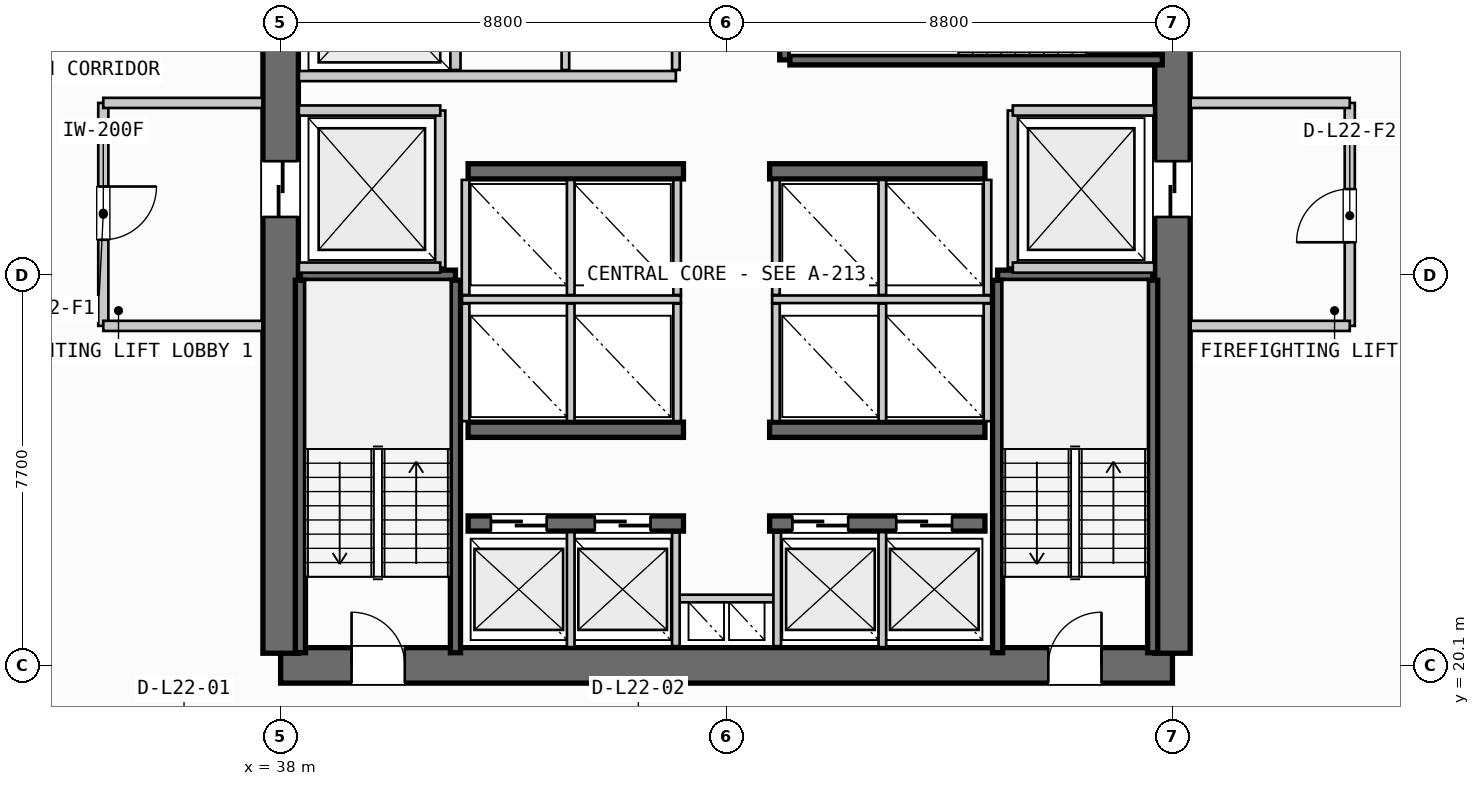
"""IFC4 building model, lengths in metres.
Left out: names, types, materials, properties, quantities, classifications, styles, units other than length and angle.
Written with IfcOpenShell. Run it as: python <this file> out.ifc"""

import sys

from ifc_helpers import new_model, si_unit, direction, frame, frame_2d, origin, place, context, subcontext, project, spatial, rectangle, extrude, source, transform, mapped, element, fill, save


model = new_model("IFC4")
c1 = context("Model", 3, precision=1e-05, world=origin(), true_north=direction((0.0, 1.0)))
c2 = subcontext(c1, "Body", "Model", "MODEL_VIEW")
j1 = project(units=[si_unit("LENGTHUNIT", "METRE"), si_unit("PLANEANGLEUNIT", "RADIAN")], contexts=[c1])
p1 = place(None, origin())
s1 = spatial("IfcSite", under=j1, at=p1, CompositionType="ELEMENT")
p2 = place(p1, origin())
s2 = spatial("IfcBuilding", under=s1, at=p2, CompositionType="ELEMENT")
p3 = place(p2, frame((0.0, 0.0, 92.8)))
s3 = spatial("IfcBuildingStorey", under=s2, at=p3, CompositionType="ELEMENT", Elevation=92.8)
p4 = place(p3, frame((38.0, 20.1, 0.0), z_axis=(0.0, 0.0, 1.0), x_axis=(1.0, 0.0, 0.0)))
e1 = element("IfcWall", 1, at=p4, inside=s3, PredefinedType="SHEAR", context=c2, shape_type="SweptSolid", body=[
    extrude(rectangle(XDim=17.6, YDim=0.7, at=frame_2d((8.8, 0.0))), origin(), (0.0, 0.0, 1.0), 3.35),
])
p5 = place(p4, frame((1.4, 0.0, 0.0)))
e2 = element("IfcOpeningElement", 2, at=p5, cuts=e1, PredefinedType="OPENING", context=c2, shape_type="SweptSolid", body=[
    extrude(rectangle(XDim=1.05, YDim=2.15, at=frame_2d((0.525, 1.075))), frame((0.0, 0.36, 0.0), z_axis=(0.0, -1.0, 0.0), x_axis=(1.0, 0.0, 0.0)), (0.0, 0.0, 1.0), 0.72),
])
p6 = place(p4, frame((15.15, 0.0, 0.0)))
e3 = element("IfcOpeningElement", 3, at=p6, cuts=e1, PredefinedType="OPENING", context=c2, shape_type="SweptSolid", body=[
    extrude(rectangle(XDim=1.05, YDim=2.15, at=frame_2d((0.525, 1.075))), frame((0.0, 0.36, 0.0), z_axis=(0.0, -1.0, 0.0), x_axis=(1.0, 0.0, 0.0)), (0.0, 0.0, 1.0), 0.72),
])
p7 = place(p3, frame((38.0, 35.26, 0.0), z_axis=(0.0, 0.0, 1.0), x_axis=(0.0, -1.0, 0.0)))
e4 = element("IfcWall", 4, at=p7, inside=s3, PredefinedType="SHEAR", context=c2, shape_type="SweptSolid", body=[
    extrude(rectangle(XDim=14.92, YDim=0.7, at=frame_2d((7.46, 0.0))), origin(), (0.0, 0.0, 1.0), 3.35),
])
p8 = place(p7, frame((5.21, 0.0, 0.0)))
e5 = element("IfcOpeningElement", 5, at=p8, cuts=e4, PredefinedType="OPENING", context=c2, shape_type="SweptSolid", body=[
    extrude(rectangle(XDim=1.1, YDim=2.2, at=frame_2d((0.55, 1.1))), frame((0.0, 0.36, 0.0), z_axis=(0.0, -1.0, 0.0), x_axis=(1.0, 0.0, 0.0)), (0.0, 0.0, 1.0), 0.72),
])
p9 = place(p3, frame((55.6, 20.34, 0.0), z_axis=(0.0, 0.0, 1.0), x_axis=(0.0, 1.0, 0.0)))
e6 = element("IfcWall", 6, at=p9, inside=s3, PredefinedType="SHEAR", context=c2, shape_type="SweptSolid", body=[
    extrude(rectangle(XDim=14.92, YDim=0.7, at=frame_2d((7.46, 0.0))), origin(), (0.0, 0.0, 1.0), 3.35),
])
p10 = place(p9, frame((12.71, 0.0, 0.0)))
e7 = element("IfcOpeningElement", 7, at=p10, cuts=e6, PredefinedType="OPENING", context=c2, shape_type="SweptSolid", body=[
    extrude(rectangle(XDim=1.05, YDim=2.15, at=frame_2d((0.525, 1.075))), frame((0.0, 0.36, 0.0), z_axis=(0.0, -1.0, 0.0), x_axis=(1.0, 0.0, 0.0)), (0.0, 0.0, 1.0), 0.72),
])
p11 = place(p9, frame((8.61, 0.0, 0.0)))
e8 = element("IfcOpeningElement", 8, at=p11, cuts=e6, PredefinedType="OPENING", context=c2, shape_type="SweptSolid", body=[
    extrude(rectangle(XDim=1.1, YDim=2.2, at=frame_2d((0.55, 1.1))), frame((0.0, 0.36, 0.0), z_axis=(0.0, -1.0, 0.0), x_axis=(1.0, 0.0, 0.0)), (0.0, 0.0, 1.0), 0.72),
])
p12 = place(p3, frame((41.7, 22.9, 0.0), z_axis=(0.0, 0.0, 1.0), x_axis=(1.0, 0.0, 0.0)))
e9 = element("IfcWall", 9, at=p12, inside=s3, PredefinedType="SHEAR", context=c2, shape_type="SweptSolid", body=[
    extrude(rectangle(XDim=4.25, YDim=0.3, at=frame_2d((2.125, 0.0))), origin(), (0.0, 0.0, 1.0), 3.35),
])
p13 = place(p12, frame((0.45, 0.0, 0.0)))
e10 = element("IfcOpeningElement", 10, at=p13, cuts=e9, PredefinedType="OPENING", context=c2, shape_type="SweptSolid", body=[
    extrude(rectangle(XDim=1.1, YDim=2.2, at=frame_2d((0.55, 1.1))), frame((0.0, 0.16, 0.0), z_axis=(0.0, -1.0, 0.0), x_axis=(1.0, 0.0, 0.0)), (0.0, 0.0, 1.0), 0.32),
])
p14 = place(p12, frame((2.5, 0.0, 0.0)))
e11 = element("IfcOpeningElement", 11, at=p14, cuts=e9, PredefinedType="OPENING", context=c2, shape_type="SweptSolid", body=[
    extrude(rectangle(XDim=1.1, YDim=2.2, at=frame_2d((0.55, 1.1))), frame((0.0, 0.16, 0.0), z_axis=(0.0, -1.0, 0.0), x_axis=(1.0, 0.0, 0.0)), (0.0, 0.0, 1.0), 0.32),
])
p15 = place(p3, frame((47.65, 22.9, 0.0), z_axis=(0.0, 0.0, 1.0), x_axis=(1.0, 0.0, 0.0)))
e12 = element("IfcWall", 12, at=p15, inside=s3, PredefinedType="SHEAR", context=c2, shape_type="SweptSolid", body=[
    extrude(rectangle(XDim=4.25, YDim=0.3, at=frame_2d((2.125, 0.0))), origin(), (0.0, 0.0, 1.0), 3.35),
])
p16 = place(p15, frame((0.45, 0.0, 0.0)))
e13 = element("IfcOpeningElement", 13, at=p16, cuts=e12, PredefinedType="OPENING", context=c2, shape_type="SweptSolid", body=[
    extrude(rectangle(XDim=1.1, YDim=2.2, at=frame_2d((0.55, 1.1))), frame((0.0, 0.16, 0.0), z_axis=(0.0, -1.0, 0.0), x_axis=(1.0, 0.0, 0.0)), (0.0, 0.0, 1.0), 0.32),
])
p17 = place(p15, frame((2.5, 0.0, 0.0)))
e14 = element("IfcOpeningElement", 14, at=p17, cuts=e12, PredefinedType="OPENING", context=c2, shape_type="SweptSolid", body=[
    extrude(rectangle(XDim=1.1, YDim=2.2, at=frame_2d((0.55, 1.1))), frame((0.0, 0.16, 0.0), z_axis=(0.0, -1.0, 0.0), x_axis=(1.0, 0.0, 0.0)), (0.0, 0.0, 1.0), 0.32),
])
for number, where, z_axis, x_axis in (
    (15, (41.7, 24.75, 0.0), (0.0, 0.0, 1.0), (1.0, 0.0, 0.0)),
    (16, (47.65, 24.75, 0.0), (0.0, 0.0, 1.0), (1.0, 0.0, 0.0)),
    (17, (41.7, 29.85, 0.0), (0.0, 0.0, 1.0), (1.0, 0.0, 0.0)),
    (18, (47.65, 29.85, 0.0), (0.0, 0.0, 1.0), (1.0, 0.0, 0.0)),
):
    element("IfcWall", number, at=place(p3, frame(where, z_axis=z_axis, x_axis=x_axis)), inside=s3, PredefinedType="SHEAR", context=c2, shape_type="SweptSolid", body=[
        extrude(rectangle(XDim=4.25, YDim=0.3, at=frame_2d((2.125, 0.0))), origin(), (0.0, 0.0, 1.0), 3.35),
    ])
p18 = place(p3, frame((38.39, 27.8, 0.0), z_axis=(0.0, 0.0, 1.0), x_axis=(1.0, 0.0, 0.0)))
e19 = element("IfcWall", 19, at=p18, inside=s3, PredefinedType="SHEAR", context=c2, shape_type="SweptSolid", body=[
    extrude(rectangle(XDim=3.06, YDim=0.2, at=frame_2d((1.53, 0.0))), origin(), (0.0, 0.0, 1.0), 3.35),
])
for number, where, z_axis, x_axis in (
    (20, (41.45, 27.7, 0.0), (0.0, 0.0, 1.0), (0.0, -1.0, 0.0)),
    (21, (38.39, 20.35, 0.0), (0.0, 0.0, 1.0), (0.0, 1.0, 0.0)),
):
    element("IfcWall", number, at=place(p3, frame(where, z_axis=z_axis, x_axis=x_axis)), inside=s3, PredefinedType="SHEAR", context=c2, shape_type="SweptSolid", body=[
        extrude(rectangle(XDim=7.35, YDim=0.2, at=frame_2d((3.675, 0.0))), origin(), (0.0, 0.0, 1.0), 3.35),
    ])
p19 = place(p3, frame((52.15, 27.8, 0.0), z_axis=(0.0, 0.0, 1.0), x_axis=(1.0, 0.0, 0.0)))
e22 = element("IfcWall", 22, at=p19, inside=s3, PredefinedType="SHEAR", context=c2, shape_type="SweptSolid", body=[
    extrude(rectangle(XDim=3.06, YDim=0.2, at=frame_2d((1.53, 0.0))), origin(), (0.0, 0.0, 1.0), 3.35),
])
for number, where, z_axis, x_axis in (
    (23, (55.21, 27.7, 0.0), (0.0, 0.0, 1.0), (0.0, -1.0, 0.0)),
    (24, (52.15, 20.35, 0.0), (0.0, 0.0, 1.0), (0.0, 1.0, 0.0)),
):
    element("IfcWall", number, at=place(p3, frame(where, z_axis=z_axis, x_axis=x_axis)), inside=s3, PredefinedType="SHEAR", context=c2, shape_type="SweptSolid", body=[
        extrude(rectangle(XDim=7.35, YDim=0.2, at=frame_2d((3.675, 0.0))), origin(), (0.0, 0.0, 1.0), 3.35),
    ])
p20 = place(p3, frame((47.95, 32.05, 0.0), z_axis=(0.0, 0.0, 1.0), x_axis=(0.0, 1.0, 0.0)))
e25 = element("IfcWall", 25, at=p20, inside=s3, PredefinedType="SHEAR", context=c2, shape_type="SweptSolid", body=[
    extrude(rectangle(XDim=3.06, YDim=0.2, at=frame_2d((1.53, 0.0))), origin(), (0.0, 0.0, 1.0), 3.35),
])
p21 = place(p3, frame((55.4, 32.05, 0.0), z_axis=(0.0, 0.0, 1.0), x_axis=(-1.0, 0.0, 0.0)))
e26 = element("IfcWall", 26, at=p21, inside=s3, PredefinedType="SHEAR", context=c2, shape_type="SweptSolid", body=[
    extrude(rectangle(XDim=7.35, YDim=0.2, at=frame_2d((3.675, 0.0))), origin(), (0.0, 0.0, 1.0), 3.35),
])
p22 = place(p3, frame((45.8, 21.42, 0.0), z_axis=(0.0, 0.0, 1.0), x_axis=(1.0, 0.0, 0.0)))
e27 = element("IfcWall", 27, at=p22, inside=s3, PredefinedType="PARTITIONING", context=c2, shape_type="SweptSolid", body=[
    extrude(rectangle(XDim=2.0, YDim=0.15, at=frame_2d((1.0, 0.0))), origin(), (0.0, 0.0, 1.0), 2.28),
])
for number, where, z_axis, x_axis in (
    (28, (45.8, 20.48, 0.0), (0.0, 0.0, 1.0), (0.0, 1.0, 0.0)),
    (29, (47.8, 20.48, 0.0), (0.0, 0.0, 1.0), (0.0, 1.0, 0.0)),
):
    element("IfcWall", number, at=place(p3, frame(where, z_axis=z_axis, x_axis=x_axis)), inside=s3, PredefinedType="PARTITIONING", context=c2, shape_type="SweptSolid", body=[
        extrude(rectangle(XDim=2.24, YDim=0.15, at=frame_2d((1.12, 0.0))), origin(), (0.0, 0.0, 1.0), 2.28),
    ])
p23 = place(p3, frame((41.15, 27.95, 0.0), z_axis=(0.0, 0.0, 1.0), x_axis=(0.0, 1.0, 0.0)))
e30 = element("IfcWall", 30, at=p23, inside=s3, PredefinedType="PARTITIONING", context=c2, shape_type="SweptSolid", body=[
    extrude(rectangle(XDim=3.1, YDim=0.2, at=frame_2d((1.55, 0.0))), origin(), (0.0, 0.0, 1.0), 2.28),
])
for number, where, z_axis, x_axis in (
    (31, (38.36, 27.95, 0.0), (0.0, 0.0, 1.0), (1.0, 0.0, 0.0)),
    (32, (38.36, 31.05, 0.0), (0.0, 0.0, 1.0), (1.0, 0.0, 0.0)),
):
    element("IfcWall", number, at=place(p3, frame(where, z_axis=z_axis, x_axis=x_axis)), inside=s3, PredefinedType="PARTITIONING", context=c2, shape_type="SweptSolid", body=[
        extrude(rectangle(XDim=2.79, YDim=0.2, at=frame_2d((1.395, 0.0))), origin(), (0.0, 0.0, 1.0), 2.28),
    ])
p24 = place(p3, frame((34.5, 31.2, 0.0), z_axis=(0.0, 0.0, 1.0), x_axis=(0.0, -1.0, 0.0)))
e33 = element("IfcWall", 33, at=p24, inside=s3, PredefinedType="PARTITIONING", context=c2, shape_type="SweptSolid", body=[
    extrude(rectangle(XDim=4.4, YDim=0.2, at=frame_2d((2.2, 0.0))), origin(), (0.0, 0.0, 1.0), 2.28),
])
p25 = place(p24, frame((1.65, 0.0, 0.0)))
e34 = element("IfcOpeningElement", 34, at=p25, cuts=e33, PredefinedType="OPENING", context=c2, shape_type="SweptSolid", body=[
    extrude(rectangle(XDim=1.05, YDim=2.15, at=frame_2d((0.525, 1.075))), frame((0.0, 0.11, 0.0), z_axis=(0.0, -1.0, 0.0), x_axis=(1.0, 0.0, 0.0)), (0.0, 0.0, 1.0), 0.22),
])
for number, where, z_axis, x_axis in (
    (35, (34.5, 26.8, 0.0), (0.0, 0.0, 1.0), (1.0, 0.0, 0.0)),
    (36, (34.5, 31.2, 0.0), (0.0, 0.0, 1.0), (1.0, 0.0, 0.0)),
):
    element("IfcWall", number, at=place(p3, frame(where, z_axis=z_axis, x_axis=x_axis)), inside=s3, PredefinedType="PARTITIONING", context=c2, shape_type="SweptSolid", body=[
        extrude(rectangle(XDim=3.14, YDim=0.2, at=frame_2d((1.57, 0.0))), origin(), (0.0, 0.0, 1.0), 2.28),
    ])
p26 = place(p3, frame((52.45, 27.95, 0.0), z_axis=(0.0, 0.0, 1.0), x_axis=(0.0, 1.0, 0.0)))
e37 = element("IfcWall", 37, at=p26, inside=s3, PredefinedType="PARTITIONING", context=c2, shape_type="SweptSolid", body=[
    extrude(rectangle(XDim=3.1, YDim=0.2, at=frame_2d((1.55, 0.0))), origin(), (0.0, 0.0, 1.0), 2.28),
])
for number, where, z_axis, x_axis in (
    (38, (52.45, 27.95, 0.0), (0.0, 0.0, 1.0), (1.0, 0.0, 0.0)),
    (39, (52.45, 31.05, 0.0), (0.0, 0.0, 1.0), (1.0, 0.0, 0.0)),
):
    element("IfcWall", number, at=place(p3, frame(where, z_axis=z_axis, x_axis=x_axis)), inside=s3, PredefinedType="PARTITIONING", context=c2, shape_type="SweptSolid", body=[
        extrude(rectangle(XDim=2.79, YDim=0.2, at=frame_2d((1.395, 0.0))), origin(), (0.0, 0.0, 1.0), 2.28),
    ])
p27 = place(p3, frame((59.1, 26.8, 0.0), z_axis=(0.0, 0.0, 1.0), x_axis=(0.0, 1.0, 0.0)))
e40 = element("IfcWall", 40, at=p27, inside=s3, PredefinedType="PARTITIONING", context=c2, shape_type="SweptSolid", body=[
    extrude(rectangle(XDim=4.4, YDim=0.2, at=frame_2d((2.2, 0.0))), origin(), (0.0, 0.0, 1.0), 2.28),
])
p28 = place(p27, frame((1.65, 0.0, 0.0)))
e41 = element("IfcOpeningElement", 41, at=p28, cuts=e40, PredefinedType="OPENING", context=c2, shape_type="SweptSolid", body=[
    extrude(rectangle(XDim=1.05, YDim=2.15, at=frame_2d((0.525, 1.075))), frame((0.0, 0.11, 0.0), z_axis=(0.0, -1.0, 0.0), x_axis=(1.0, 0.0, 0.0)), (0.0, 0.0, 1.0), 0.22),
])
for number, where, z_axis, x_axis in (
    (42, (55.96, 26.8, 0.0), (0.0, 0.0, 1.0), (1.0, 0.0, 0.0)),
    (43, (55.96, 31.2, 0.0), (0.0, 0.0, 1.0), (1.0, 0.0, 0.0)),
):
    element("IfcWall", number, at=place(p3, frame(where, z_axis=z_axis, x_axis=x_axis)), inside=s3, PredefinedType="PARTITIONING", context=c2, shape_type="SweptSolid", body=[
        extrude(rectangle(XDim=3.14, YDim=0.2, at=frame_2d((1.57, 0.0))), origin(), (0.0, 0.0, 1.0), 2.28),
    ])
for number, where, z_axis, x_axis in (
    (44, (43.725, 20.46, 0.0), (0.0, 0.0, 1.0), (0.0, 1.0, 0.0)),
    (45, (49.875, 20.46, 0.0), (0.0, 0.0, 1.0), (0.0, 1.0, 0.0)),
):
    element("IfcWall", number, at=place(p3, frame(where, z_axis=z_axis, x_axis=x_axis)), inside=s3, PredefinedType="PARTITIONING", context=c2, shape_type="SweptSolid", body=[
        extrude(rectangle(XDim=2.27, YDim=0.15, at=frame_2d((1.135, 0.0))), origin(), (0.0, 0.0, 1.0), 2.28),
    ])
p29 = place(p3, frame((41.58, 27.325, 0.0), z_axis=(0.0, 0.0, 1.0), x_axis=(1.0, 0.0, 0.0)))
e46 = element("IfcWall", 46, at=p29, inside=s3, PredefinedType="PARTITIONING", context=c2, shape_type="SweptSolid", body=[
    extrude(rectangle(XDim=4.32, YDim=0.15, at=frame_2d((2.16, 0.0))), origin(), (0.0, 0.0, 1.0), 2.28),
])
p30 = place(p3, frame((47.7, 27.325, 0.0), z_axis=(0.0, 0.0, 1.0), x_axis=(1.0, 0.0, 0.0)))
e47 = element("IfcWall", 47, at=p30, inside=s3, PredefinedType="PARTITIONING", context=c2, shape_type="SweptSolid", body=[
    extrude(rectangle(XDim=4.32, YDim=0.15, at=frame_2d((2.16, 0.0))), origin(), (0.0, 0.0, 1.0), 2.28),
])
for number, where, z_axis, x_axis in (
    (48, (41.65, 24.92, 0.0), (0.0, 0.0, 1.0), (0.0, 1.0, 0.0)),
    (49, (43.725, 24.92, 0.0), (0.0, 0.0, 1.0), (0.0, 1.0, 0.0)),
    (50, (45.825, 24.92, 0.0), (0.0, 0.0, 1.0), (0.0, 1.0, 0.0)),
    (51, (47.775, 24.92, 0.0), (0.0, 0.0, 1.0), (0.0, 1.0, 0.0)),
    (52, (49.875, 24.92, 0.0), (0.0, 0.0, 1.0), (0.0, 1.0, 0.0)),
    (53, (51.95, 24.92, 0.0), (0.0, 0.0, 1.0), (0.0, 1.0, 0.0)),
):
    element("IfcWall", number, at=place(p3, frame(where, z_axis=z_axis, x_axis=x_axis)), inside=s3, PredefinedType="PARTITIONING", context=c2, shape_type="SweptSolid", body=[
        extrude(rectangle(XDim=2.32, YDim=0.15, at=frame_2d((1.16, 0.0))), origin(), (0.0, 0.0, 1.0), 2.28),
    ])
for number, where, z_axis, x_axis in (
    (54, (41.65, 27.41, 0.0), (0.0, 0.0, 1.0), (0.0, 1.0, 0.0)),
    (55, (43.725, 27.41, 0.0), (0.0, 0.0, 1.0), (0.0, 1.0, 0.0)),
    (56, (45.825, 27.41, 0.0), (0.0, 0.0, 1.0), (0.0, 1.0, 0.0)),
    (57, (47.775, 27.41, 0.0), (0.0, 0.0, 1.0), (0.0, 1.0, 0.0)),
    (58, (49.875, 27.41, 0.0), (0.0, 0.0, 1.0), (0.0, 1.0, 0.0)),
    (59, (51.95, 27.41, 0.0), (0.0, 0.0, 1.0), (0.0, 1.0, 0.0)),
):
    element("IfcWall", number, at=place(p3, frame(where, z_axis=z_axis, x_axis=x_axis)), inside=s3, PredefinedType="PARTITIONING", context=c2, shape_type="SweptSolid", body=[
        extrude(rectangle(XDim=2.27, YDim=0.15, at=frame_2d((1.135, 0.0))), origin(), (0.0, 0.0, 1.0), 2.28),
    ])
p31 = place(p3, frame((41.45, 31.85, 0.0), z_axis=(0.0, 0.0, 1.0), x_axis=(0.0, 1.0, 0.0)))
e60 = element("IfcWall", 60, at=p31, inside=s3, PredefinedType="PARTITIONING", context=c2, shape_type="SweptSolid", body=[
    extrude(rectangle(XDim=3.29, YDim=0.2, at=frame_2d((1.645, 0.0))), origin(), (0.0, 0.0, 1.0), 2.28),
])
p32 = place(p3, frame((38.36, 31.73, 0.0), z_axis=(0.0, 0.0, 1.0), x_axis=(1.0, 0.0, 0.0)))
e61 = element("IfcWall", 61, at=p32, inside=s3, PredefinedType="PARTITIONING", context=c2, shape_type="SweptSolid", body=[
    extrude(rectangle(XDim=7.44, YDim=0.2, at=frame_2d((3.72, 0.0))), origin(), (0.0, 0.0, 1.0), 2.28),
])
p33 = place(p3, frame((45.8, 31.85, 0.0), z_axis=(0.0, 0.0, 1.0), x_axis=(0.0, 1.0, 0.0)))
e62 = element("IfcWall", 62, at=p33, inside=s3, PredefinedType="PARTITIONING", context=c2, shape_type="SweptSolid", body=[
    extrude(rectangle(XDim=3.29, YDim=0.15, at=frame_2d((1.645, 0.0))), origin(), (0.0, 0.0, 1.0), 2.28),
])
p34 = place(p3, frame((43.62, 31.85, 0.0), z_axis=(0.0, 0.0, 1.0), x_axis=(0.0, 1.0, 0.0)))
e63 = element("IfcWall", 63, at=p34, inside=s3, PredefinedType="PLUMBINGWALL", context=c2, shape_type="SweptSolid", body=[
    extrude(rectangle(XDim=3.29, YDim=0.15, at=frame_2d((1.645, 0.0))), origin(), (0.0, 0.0, 1.0), 2.28),
])
m1 = source(origin(), c2, "Body", "SweptSolid", [
    extrude(rectangle(XDim=1.05, YDim=2.15, at=frame_2d((0.525, 1.075))), frame((0.0, 0.025, 0.0), z_axis=(0.0, -1.0, 0.0), x_axis=(1.0, 0.0, 0.0)), (0.0, 0.0, 1.0), 0.05),
])
p35 = place(p5, origin())
e64 = element("IfcDoor", 64, at=p35, inside=s3, OperationType="SINGLE_SWING_LEFT", PredefinedType="DOOR", context=c2, shape_type="MappedRepresentation", body=[
    mapped(m1, transform((0.0, 0.0, 0.0), scale=1.0)),
])
fill(e2, e64)
p36 = place(p6, origin())
e65 = element("IfcDoor", 65, at=p36, inside=s3, OperationType="SINGLE_SWING_RIGHT", PredefinedType="DOOR", context=c2, shape_type="MappedRepresentation", body=[
    mapped(m1, transform((0.0, 0.0, 0.0), scale=1.0)),
])
fill(e3, e65)
m2 = source(origin(), c2, "Body", "SweptSolid", [
    extrude(rectangle(XDim=1.1, YDim=2.2, at=frame_2d((0.55, 1.1))), frame((0.0, 0.025, 0.0), z_axis=(0.0, -1.0, 0.0), x_axis=(1.0, 0.0, 0.0)), (0.0, 0.0, 1.0), 0.05),
])
p37 = place(p8, origin())
e66 = element("IfcDoor", 66, at=p37, inside=s3, OperationType="SLIDING_TO_LEFT", PredefinedType="DOOR", context=c2, shape_type="MappedRepresentation", body=[
    mapped(m2, transform((0.0, 0.0, 0.0), scale=1.0)),
])
fill(e5, e66)
p38 = place(p11, origin())
e67 = element("IfcDoor", 67, at=p38, inside=s3, OperationType="SLIDING_TO_RIGHT", PredefinedType="DOOR", context=c2, shape_type="MappedRepresentation", body=[
    mapped(m2, transform((0.0, 0.0, 0.0), scale=1.0)),
])
fill(e8, e67)
p39 = place(p13, origin())
e68 = element("IfcDoor", 68, at=p39, inside=s3, OperationType="SLIDING_TO_LEFT", PredefinedType="DOOR", context=c2, shape_type="MappedRepresentation", body=[
    mapped(m2, transform((0.0, 0.0, 0.0), scale=1.0)),
])
fill(e10, e68)
p40 = place(p14, origin())
e69 = element("IfcDoor", 69, at=p40, inside=s3, OperationType="SLIDING_TO_LEFT", PredefinedType="DOOR", context=c2, shape_type="MappedRepresentation", body=[
    mapped(m2, transform((0.0, 0.0, 0.0), scale=1.0)),
])
fill(e11, e69)
p41 = place(p16, origin())
e70 = element("IfcDoor", 70, at=p41, inside=s3, OperationType="SLIDING_TO_LEFT", PredefinedType="DOOR", context=c2, shape_type="MappedRepresentation", body=[
    mapped(m2, transform((0.0, 0.0, 0.0), scale=1.0)),
])
fill(e13, e70)
p42 = place(p17, origin())
e71 = element("IfcDoor", 71, at=p42, inside=s3, OperationType="SLIDING_TO_LEFT", PredefinedType="DOOR", context=c2, shape_type="MappedRepresentation", body=[
    mapped(m2, transform((0.0, 0.0, 0.0), scale=1.0)),
])
fill(e14, e71)
p43 = place(p25, origin())
e72 = element("IfcDoor", 72, at=p43, inside=s3, OperationType="SINGLE_SWING_LEFT", PredefinedType="DOOR", context=c2, shape_type="MappedRepresentation", body=[
    mapped(m1, transform((0.0, 0.0, 0.0), scale=1.0)),
])
fill(e34, e72)
p44 = place(p28, origin())
e73 = element("IfcDoor", 73, at=p44, inside=s3, OperationType="SINGLE_SWING_LEFT", PredefinedType="DOOR", context=c2, shape_type="MappedRepresentation", body=[
    mapped(m1, transform((0.0, 0.0, 0.0), scale=1.0)),
])
fill(e41, e73)
save(model, sys.argv[1])
